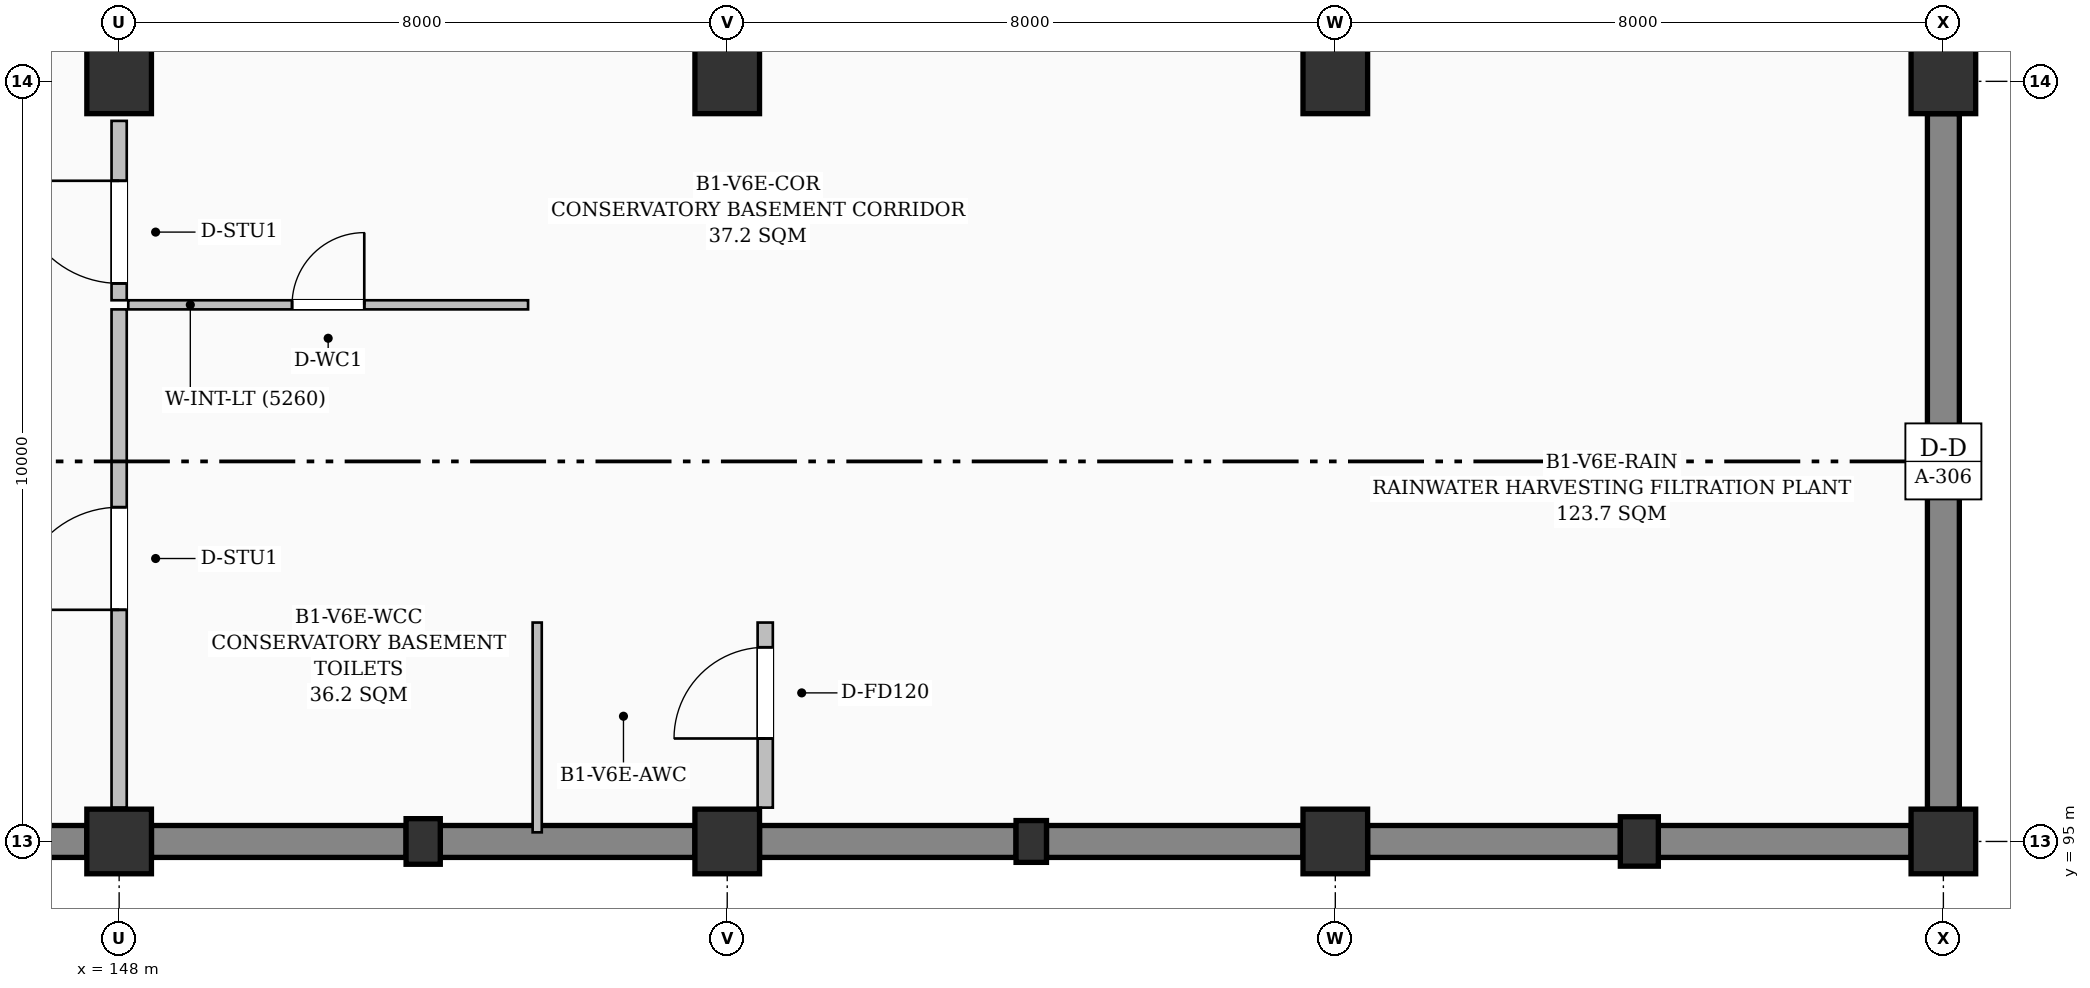
"""IFC4 building model, lengths in metres.
Left out: names, types, materials, properties, quantities, classifications, styles, units other than length and angle.
Written with IfcOpenShell. Run it as: python <this file> out.ifc"""

import sys

from ifc_helpers import new_model, si_unit, direction, frame, frame_2d, origin, origin_2d, place, context, subcontext, project, spatial, rectangle, extrude, element, fill, save


model = new_model("IFC4")
c1 = context("Model", 3, precision=1e-05, world=origin(), true_north=direction((0.0, 1.0)))
c2 = subcontext(c1, "Body", "Model", "MODEL_VIEW")
j1 = project(units=[si_unit("LENGTHUNIT", "METRE"), si_unit("PLANEANGLEUNIT", "RADIAN")], contexts=[c1])
p1 = place(None, origin())
s1 = spatial("IfcSite", under=j1, at=p1, CompositionType="ELEMENT")
p2 = place(p1, origin())
s2 = spatial("IfcBuilding", under=s1, at=p2, CompositionType="ELEMENT")
p3 = place(p2, frame((0.0, 0.0, -4.8)))
s3 = spatial("IfcBuildingStorey", under=s2, at=p3, CompositionType="ELEMENT", Elevation=-4.8)
for number, where, z_axis, x_axis in (
    (1, (148.0, 95.0, -0.38), (0.0, 0.0, 1.0), (1.0, 0.0, 0.0)),
    (2, (148.0, 105.0, -0.38), (0.0, 0.0, 1.0), (1.0, 0.0, 0.0)),
):
    element("IfcColumn", number, at=place(p3, frame(where, z_axis=z_axis, x_axis=x_axis)), inside=s3, PredefinedType="COLUMN", context=c2, shape_type="SweptSolid", body=[
        extrude(rectangle(XDim=0.85, YDim=0.85, at=origin_2d()), origin(), (0.0, 0.0, 1.0), 5.18),
    ])
p4 = place(p3, frame((152.0, 95.0, -0.38), z_axis=(0.0, 0.0, 1.0), x_axis=(1.0, 0.0, 0.0)))
e3 = element("IfcColumn", 3, at=p4, inside=s3, PredefinedType="PILASTER", context=c2, shape_type="SweptSolid", body=[
    extrude(rectangle(XDim=0.45, YDim=0.6, at=origin_2d()), origin(), (0.0, 0.0, 1.0), 5.18),
])
for number, where, z_axis, x_axis in (
    (4, (156.0, 95.0, -0.38), (0.0, 0.0, 1.0), (1.0, 0.0, 0.0)),
    (5, (156.0, 105.0, -0.38), (0.0, 0.0, 1.0), (1.0, 0.0, 0.0)),
):
    element("IfcColumn", number, at=place(p3, frame(where, z_axis=z_axis, x_axis=x_axis)), inside=s3, PredefinedType="COLUMN", context=c2, shape_type="SweptSolid", body=[
        extrude(rectangle(XDim=0.85, YDim=0.85, at=origin_2d()), origin(), (0.0, 0.0, 1.0), 5.18),
    ])
p5 = place(p3, frame((160.0, 95.0, -0.38), z_axis=(0.0, 0.0, 1.0), x_axis=(1.0, 0.0, 0.0)))
e6 = element("IfcColumn", 6, at=p5, inside=s3, PredefinedType="PILASTER", context=c2, shape_type="SweptSolid", body=[
    extrude(rectangle(XDim=0.4, YDim=0.55, at=origin_2d()), origin(), (0.0, 0.0, 1.0), 5.18),
])
for number, where, z_axis, x_axis in (
    (7, (164.0, 95.0, -0.38), (0.0, 0.0, 1.0), (1.0, 0.0, 0.0)),
    (8, (164.0, 105.0, -0.38), (0.0, 0.0, 1.0), (1.0, 0.0, 0.0)),
):
    element("IfcColumn", number, at=place(p3, frame(where, z_axis=z_axis, x_axis=x_axis)), inside=s3, PredefinedType="COLUMN", context=c2, shape_type="SweptSolid", body=[
        extrude(rectangle(XDim=0.85, YDim=0.85, at=origin_2d()), origin(), (0.0, 0.0, 1.0), 5.18),
    ])
p6 = place(p3, frame((168.0, 95.0, -0.38), z_axis=(0.0, 0.0, 1.0), x_axis=(1.0, 0.0, 0.0)))
e9 = element("IfcColumn", 9, at=p6, inside=s3, PredefinedType="PILASTER", context=c2, shape_type="SweptSolid", body=[
    extrude(rectangle(XDim=0.5, YDim=0.65, at=origin_2d()), origin(), (0.0, 0.0, 1.0), 5.18),
])
for number, where, z_axis, x_axis in (
    (10, (172.0, 95.0, -0.38), (0.0, 0.0, 1.0), (1.0, 0.0, 0.0)),
    (11, (172.0, 105.0, -0.38), (0.0, 0.0, 1.0), (1.0, 0.0, 0.0)),
):
    element("IfcColumn", number, at=place(p3, frame(where, z_axis=z_axis, x_axis=x_axis)), inside=s3, PredefinedType="COLUMN", context=c2, shape_type="SweptSolid", body=[
        extrude(rectangle(XDim=0.85, YDim=0.85, at=origin_2d()), origin(), (0.0, 0.0, 1.0), 5.18),
    ])
p7 = place(p3, frame((172.0, 104.575, 0.0), z_axis=(0.0, 0.0, 1.0), x_axis=(0.0, -1.0, 0.0)))
e12 = element("IfcWall", 12, at=p7, inside=s3, PredefinedType="USERDEFINED", context=c2, shape_type="SweptSolid", body=[
    extrude(rectangle(XDim=9.15, YDim=0.42, at=frame_2d((4.575, 0.0))), origin(), (0.0, 0.0, 1.0), 3.85),
])
for number, where, z_axis, x_axis in (
    (13, (171.575, 95.0, 0.0), (0.0, 0.0, 1.0), (-1.0, 0.0, 0.0)),
    (14, (167.75, 95.0, 0.0), (0.0, 0.0, 1.0), (-1.0, 0.0, 0.0)),
):
    element("IfcWall", number, at=place(p3, frame(where, z_axis=z_axis, x_axis=x_axis)), inside=s3, PredefinedType="USERDEFINED", context=c2, shape_type="SweptSolid", body=[
        extrude(rectangle(XDim=3.325, YDim=0.42, at=frame_2d((1.663, 0.0))), origin(), (0.0, 0.0, 1.0), 3.85),
    ])
for number, where, z_axis, x_axis in (
    (15, (163.575, 95.0, 0.0), (0.0, 0.0, 1.0), (-1.0, 0.0, 0.0)),
    (16, (159.8, 95.0, 0.0), (0.0, 0.0, 1.0), (-1.0, 0.0, 0.0)),
):
    element("IfcWall", number, at=place(p3, frame(where, z_axis=z_axis, x_axis=x_axis)), inside=s3, PredefinedType="USERDEFINED", context=c2, shape_type="SweptSolid", body=[
        extrude(rectangle(XDim=3.375, YDim=0.42, at=frame_2d((1.688, 0.0))), origin(), (0.0, 0.0, 1.0), 3.85),
    ])
for number, where, z_axis, x_axis in (
    (17, (155.575, 95.0, 0.0), (0.0, 0.0, 1.0), (-1.0, 0.0, 0.0)),
    (18, (151.775, 95.0, 0.0), (0.0, 0.0, 1.0), (-1.0, 0.0, 0.0)),
):
    element("IfcWall", number, at=place(p3, frame(where, z_axis=z_axis, x_axis=x_axis)), inside=s3, PredefinedType="USERDEFINED", context=c2, shape_type="SweptSolid", body=[
        extrude(rectangle(XDim=3.35, YDim=0.42, at=frame_2d((1.675, 0.0))), origin(), (0.0, 0.0, 1.0), 3.85),
    ])
p8 = place(p3, frame((147.575, 95.0, 0.0), z_axis=(0.0, 0.0, 1.0), x_axis=(-1.0, 0.0, 0.0)))
e19 = element("IfcWall", 19, at=p8, inside=s3, PredefinedType="USERDEFINED", context=c2, shape_type="SweptSolid", body=[
    extrude(rectangle(XDim=3.325, YDim=0.42, at=frame_2d((1.663, 0.0))), origin(), (0.0, 0.0, 1.0), 3.85),
])
p9 = place(p3, frame((148.0, 102.12, 0.0), z_axis=(0.0, 0.0, 1.0), x_axis=(0.0, 1.0, 0.0)))
e20 = element("IfcWall", 20, at=p9, inside=s3, PredefinedType="PARTITIONING", context=c2, shape_type="SweptSolid", body=[
    extrude(rectangle(XDim=2.36, YDim=0.2, at=frame_2d((1.18, 0.0))), origin(), (0.0, 0.0, 1.0), 4.035),
])
p10 = place(p9, frame((0.222, 0.0, 0.0)))
e21 = element("IfcOpeningElement", 21, at=p10, cuts=e20, PredefinedType="OPENING", context=c2, shape_type="SweptSolid", body=[
    extrude(rectangle(XDim=1.35, YDim=2.2, at=frame_2d((0.675, 1.1))), frame((0.0, 0.11, 0.0), z_axis=(0.0, -1.0, 0.0), x_axis=(1.0, 0.0, 0.0)), (0.0, 0.0, 1.0), 0.22),
])
p11 = place(p3, frame((148.0, 95.445, 0.0), z_axis=(0.0, 0.0, 1.0), x_axis=(0.0, 1.0, 0.0)))
e22 = element("IfcWall", 22, at=p11, inside=s3, PredefinedType="PARTITIONING", context=c2, shape_type="SweptSolid", body=[
    extrude(rectangle(XDim=6.555, YDim=0.2, at=frame_2d((3.277, 0.0))), origin(), (0.0, 0.0, 1.0), 4.035),
])
p12 = place(p11, frame((2.603, 0.0, 0.0)))
e23 = element("IfcOpeningElement", 23, at=p12, cuts=e22, PredefinedType="OPENING", context=c2, shape_type="SweptSolid", body=[
    extrude(rectangle(XDim=1.35, YDim=2.2, at=frame_2d((0.675, 1.1))), frame((0.0, 0.11, 0.0), z_axis=(0.0, -1.0, 0.0), x_axis=(1.0, 0.0, 0.0)), (0.0, 0.0, 1.0), 0.22),
])
p13 = place(p3, frame((148.12, 102.06, 0.0), z_axis=(0.0, 0.0, 1.0), x_axis=(1.0, 0.0, 0.0)))
e24 = element("IfcWall", 24, at=p13, inside=s3, PredefinedType="PARTITIONING", context=c2, shape_type="SweptSolid", body=[
    extrude(rectangle(XDim=5.26, YDim=0.12, at=frame_2d((2.63, 0.0))), origin(), (0.0, 0.0, 1.0), 4.125),
])
p14 = place(p13, frame((2.155, 0.0, 0.0)))
e25 = element("IfcOpeningElement", 25, at=p14, cuts=e24, PredefinedType="OPENING", context=c2, shape_type="SweptSolid", body=[
    extrude(rectangle(XDim=0.95, YDim=2.1, at=frame_2d((0.475, 1.05))), frame((0.0, 0.07, 0.0), z_axis=(0.0, -1.0, 0.0), x_axis=(1.0, 0.0, 0.0)), (0.0, 0.0, 1.0), 0.14),
])
p15 = place(p3, frame((156.5, 95.445, 0.0), z_axis=(0.0, 0.0, 1.0), x_axis=(0.0, 1.0, 0.0)))
e26 = element("IfcWall", 26, at=p15, inside=s3, PredefinedType="PARTITIONING", context=c2, shape_type="SweptSolid", body=[
    extrude(rectangle(XDim=2.435, YDim=0.2, at=frame_2d((1.217, 0.0))), origin(), (0.0, 0.0, 1.0), 4.5),
])
p16 = place(p15, frame((0.91, 0.0, 0.0)))
e27 = element("IfcOpeningElement", 27, at=p16, cuts=e26, PredefinedType="OPENING", context=c2, shape_type="SweptSolid", body=[
    extrude(rectangle(XDim=1.2, YDim=2.2, at=frame_2d((0.6, 1.1))), frame((0.0, 0.11, 0.0), z_axis=(0.0, -1.0, 0.0), x_axis=(1.0, 0.0, 0.0)), (0.0, 0.0, 1.0), 0.22),
])
p17 = place(p3, frame((153.5, 95.12, 0.0), z_axis=(0.0, 0.0, 1.0), x_axis=(0.0, 1.0, 0.0)))
e28 = element("IfcWall", 28, at=p17, inside=s3, PredefinedType="PARTITIONING", context=c2, shape_type="SweptSolid", body=[
    extrude(rectangle(XDim=2.76, YDim=0.12, at=frame_2d((1.38, 0.0))), origin(), (0.0, 0.0, 1.0), 4.5),
])
p18 = place(p10, origin())
e29 = element("IfcDoor", 29, at=p18, inside=s3, OperationType="SINGLE_SWING_RIGHT", PredefinedType="DOOR", context=c2, shape_type="SweptSolid", body=[
    extrude(rectangle(XDim=1.35, YDim=2.2, at=frame_2d((0.675, 1.1))), frame((0.0, 0.025, 0.0), z_axis=(0.0, -1.0, 0.0), x_axis=(1.0, 0.0, 0.0)), (0.0, 0.0, 1.0), 0.05),
])
fill(e21, e29)
p19 = place(p12, origin())
e30 = element("IfcDoor", 30, at=p19, inside=s3, OperationType="SINGLE_SWING_LEFT", PredefinedType="DOOR", context=c2, shape_type="SweptSolid", body=[
    extrude(rectangle(XDim=1.35, YDim=2.2, at=frame_2d((0.675, 1.1))), frame((0.0, 0.025, 0.0), z_axis=(0.0, -1.0, 0.0), x_axis=(1.0, 0.0, 0.0)), (0.0, 0.0, 1.0), 0.05),
])
fill(e23, e30)
p20 = place(p14, origin())
e31 = element("IfcDoor", 31, at=p20, inside=s3, OperationType="SINGLE_SWING_RIGHT", PredefinedType="DOOR", context=c2, shape_type="SweptSolid", body=[
    extrude(rectangle(XDim=0.95, YDim=2.1, at=frame_2d((0.475, 1.05))), frame((0.0, 0.025, 0.0), z_axis=(0.0, -1.0, 0.0), x_axis=(1.0, 0.0, 0.0)), (0.0, 0.0, 1.0), 0.05),
])
fill(e25, e31)
p21 = place(p16, origin())
e32 = element("IfcDoor", 32, at=p21, inside=s3, OperationType="SINGLE_SWING_LEFT", PredefinedType="DOOR", context=c2, shape_type="SweptSolid", body=[
    extrude(rectangle(XDim=1.2, YDim=2.2, at=frame_2d((0.6, 1.1))), frame((0.0, 0.025, 0.0), z_axis=(0.0, -1.0, 0.0), x_axis=(1.0, 0.0, 0.0)), (0.0, 0.0, 1.0), 0.05),
])
fill(e27, e32)
save(model, sys.argv[1])
